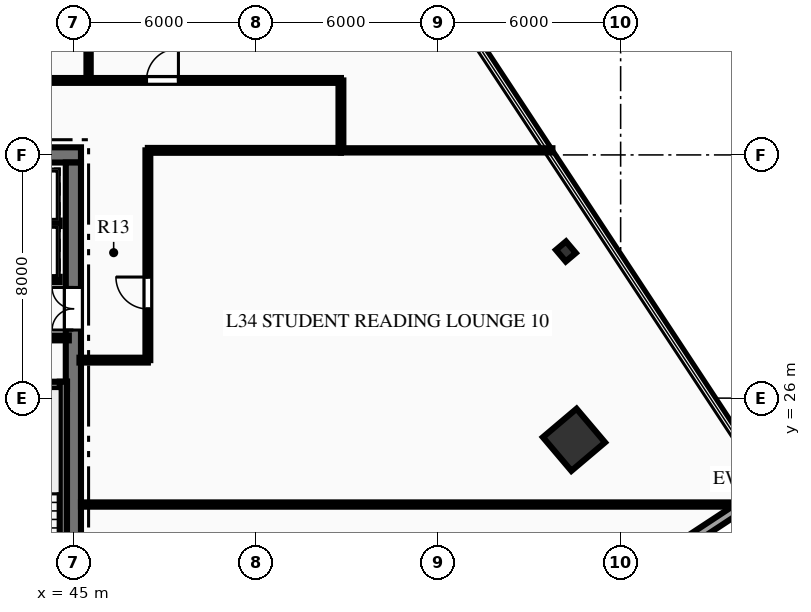
"""IFC4 building model, lengths in metres.
Left out: names, types, materials, properties, quantities, classifications, styles, units other than length and angle.
Written with IfcOpenShell. Run it as: python <this file> out.ifc"""

import sys

from ifc_helpers import new_model, si_unit, direction, frame, frame_2d, origin, origin_2d, place, context, subcontext, project, spatial, rectangle, hollow_rectangle, i_section, extrude, element, fill, save


model = new_model("IFC4")
c1 = context("Model", 3, precision=1e-05, world=origin(), true_north=direction((0.0, 1.0)))
c2 = subcontext(c1, "Body", "Model", "MODEL_VIEW")
j1 = project(units=[si_unit("LENGTHUNIT", "METRE"), si_unit("PLANEANGLEUNIT", "RADIAN")], contexts=[c1])
p1 = place(None, origin())
s1 = spatial("IfcSite", under=j1, at=p1, CompositionType="ELEMENT")
p2 = place(p1, origin())
s2 = spatial("IfcBuilding", under=s1, at=p2, CompositionType="ELEMENT")
p3 = place(p2, frame((0.0, 0.0, 140.7)))
s3 = spatial("IfcBuildingStorey", under=s2, at=p3, CompositionType="ELEMENT", Elevation=140.7)
p4 = place(p3, frame((26.75, 34.0, 0.0), z_axis=(0.0, 0.0, 1.0), x_axis=(1.0, 0.0, 0.0)))
e1 = element("IfcWall", 1, at=p4, inside=s3, PredefinedType="SHEAR", context=c2, shape_type="SweptSolid", body=[
    extrude(rectangle(XDim=18.5, YDim=0.5, at=frame_2d((9.25, 0.0))), origin(), (0.0, 0.0, 1.0), 3.75),
])
p5 = place(p4, frame((13.935, 0.0, 0.0)))
e2 = element("IfcOpeningElement", 2, at=p5, cuts=e1, PredefinedType="OPENING", context=c2, shape_type="SweptSolid", body=[
    extrude(rectangle(XDim=1.1, YDim=2.15, at=frame_2d((0.55, 1.075))), frame((0.0, 0.26, 0.0), z_axis=(0.0, -1.0, 0.0), x_axis=(1.0, 0.0, 0.0)), (0.0, 0.0, 1.0), 0.52),
])
p6 = place(p4, frame((16.185, 0.0, 0.0)))
e3 = element("IfcOpeningElement", 3, at=p6, cuts=e1, PredefinedType="OPENING", context=c2, shape_type="SweptSolid", body=[
    extrude(rectangle(XDim=1.1, YDim=2.15, at=frame_2d((0.55, 1.075))), frame((0.0, 0.26, 0.0), z_axis=(0.0, -1.0, 0.0), x_axis=(1.0, 0.0, 0.0)), (0.0, 0.0, 1.0), 0.52),
])
p7 = place(p3, frame((45.0, 18.25, 0.0), z_axis=(0.0, 0.0, 1.0), x_axis=(0.0, 1.0, 0.0)))
e4 = element("IfcWall", 4, at=p7, inside=s3, PredefinedType="SHEAR", context=c2, shape_type="SweptSolid", body=[
    extrude(rectangle(XDim=15.5, YDim=0.5, at=frame_2d((7.75, 0.0))), origin(), (0.0, 0.0, 1.0), 3.75),
])
p8 = place(p7, frame((9.99, 0.0, 0.0)))
e5 = element("IfcOpeningElement", 5, at=p8, cuts=e4, PredefinedType="OPENING", context=c2, shape_type="SweptSolid", body=[
    extrude(rectangle(XDim=1.4, YDim=2.2, at=frame_2d((0.7, 1.1))), frame((0.0, 0.26, 0.0), z_axis=(0.0, -1.0, 0.0), x_axis=(1.0, 0.0, 0.0)), (0.0, 0.0, 1.0), 0.52),
])
p9 = place(p3, frame((40.81, 26.42, 0.0), z_axis=(0.0, 0.0, 1.0), x_axis=(1.0, 0.0, 0.0)))
e6 = element("IfcWall", 6, at=p9, inside=s3, PredefinedType="SHEAR", context=c2, shape_type="SweptSolid", body=[
    extrude(rectangle(XDim=3.98, YDim=0.24, at=frame_2d((1.99, 0.0))), origin(), (0.0, 0.0, 1.0), 3.75),
])
p10 = place(p3, frame((44.67, 18.28, 0.0), z_axis=(0.0, 0.0, 1.0), x_axis=(0.0, 1.0, 0.0)))
e7 = element("IfcWall", 7, at=p10, inside=s3, PredefinedType="SHEAR", context=c2, shape_type="SweptSolid", body=[
    extrude(rectangle(XDim=8.26, YDim=0.24, at=frame_2d((4.13, 0.0))), origin(), (0.0, 0.0, 1.0), 3.75),
])
p11 = place(p3, frame((61.465, 24.629, 0.0), z_axis=(0.0, 0.0, 1.0), x_axis=(0.763232469783, 0.646123979643, 0.0)))
e8 = element("IfcColumn", 8, at=p11, inside=s3, PredefinedType="COLUMN", context=c2, shape_type="SweptSolid", body=[
    extrude(hollow_rectangle(XDim=1.45, YDim=1.45, WallThickness=0.07, at=origin_2d()), origin(), (0.0, 0.0, 1.0), 3.75),
])
p12 = place(p3, frame((61.199, 30.824, 0.0), z_axis=(0.0, 0.0, 1.0), x_axis=(0.763232469783, 0.646123979643, 0.0)))
e9 = element("IfcColumn", 9, at=p12, inside=s3, PredefinedType="COLUMN", context=c2, shape_type="SweptSolid", body=[
    extrude(i_section(OverallWidth=0.432, OverallDepth=0.498, WebThickness=0.056, FlangeThickness=0.089, at=origin_2d()), origin(), (0.0, 0.0, 1.0), 3.75),
])
p13 = place(p3, frame((68.045, 23.147, 0.0), z_axis=(0.0, 0.0, 1.0), x_axis=(-0.835331522158, -0.549746530767, 0.0)))
e10 = element("IfcWall", 10, at=p13, inside=s3, PredefinedType="STANDARD", context=c2, shape_type="SweptSolid", body=[
    extrude(rectangle(XDim=4.0, YDim=0.32, at=frame_2d((2.0, 0.0))), origin(), (0.0, 0.0, 1.0), 3.46),
])
p14 = place(p3, frame((40.8, 27.98, 0.0), z_axis=(0.0, 0.0, 1.0), x_axis=(1.0, 0.0, 0.0)))
e11 = element("IfcWall", 11, at=p14, inside=s3, PredefinedType="PARTITIONING", context=c2, shape_type="SweptSolid", body=[
    extrude(rectangle(XDim=4.05, YDim=0.16, at=frame_2d((2.025, 0.0))), origin(), (0.0, 0.0, 1.0), 3.46),
])
p15 = place(p14, frame((1.475, 0.0, 0.0)))
e12 = element("IfcOpeningElement", 12, at=p15, cuts=e11, PredefinedType="OPENING", context=c2, shape_type="SweptSolid", body=[
    extrude(rectangle(XDim=0.95, YDim=2.15, at=frame_2d((0.475, 1.075))), frame((0.0, 0.09, 0.0), z_axis=(0.0, -1.0, 0.0), x_axis=(1.0, 0.0, 0.0)), (0.0, 0.0, 1.0), 0.18),
])
p16 = place(p3, frame((40.12, 29.9, 0.0), z_axis=(0.0, 0.0, 1.0), x_axis=(1.0, 0.0, 0.0)))
e13 = element("IfcWall", 13, at=p16, inside=s3, PredefinedType="PARTITIONING", context=c2, shape_type="SweptSolid", body=[
    extrude(rectangle(XDim=4.43, YDim=0.18, at=frame_2d((2.215, 0.0))), origin(), (0.0, 0.0, 1.0), 3.46),
])
p17 = place(p16, frame((0.565, 0.0, 0.0)))
e14 = element("IfcOpeningElement", 14, at=p17, cuts=e13, PredefinedType="OPENING", context=c2, shape_type="SweptSolid", body=[
    extrude(rectangle(XDim=1.1, YDim=2.15, at=frame_2d((0.55, 1.075))), frame((0.0, 0.1, 0.0), z_axis=(0.0, -1.0, 0.0), x_axis=(1.0, 0.0, 0.0)), (0.0, 0.0, 1.0), 0.2),
])
p18 = place(p16, frame((2.815, 0.0, 0.0)))
e15 = element("IfcOpeningElement", 15, at=p18, cuts=e13, PredefinedType="OPENING", context=c2, shape_type="SweptSolid", body=[
    extrude(rectangle(XDim=1.1, YDim=2.15, at=frame_2d((0.55, 1.075))), frame((0.0, 0.1, 0.0), z_axis=(0.0, -1.0, 0.0), x_axis=(1.0, 0.0, 0.0)), (0.0, 0.0, 1.0), 0.2),
])
p19 = place(p3, frame((40.12, 31.75, 0.0), z_axis=(0.0, 0.0, 1.0), x_axis=(1.0, 0.0, 0.0)))
e16 = element("IfcWall", 16, at=p19, inside=s3, PredefinedType="PARTITIONING", context=c2, shape_type="SweptSolid", body=[
    extrude(rectangle(XDim=4.43, YDim=0.18, at=frame_2d((2.215, 0.0))), origin(), (0.0, 0.0, 1.0), 3.46),
])
p20 = place(p3, frame((18.2, 36.45, 0.0), z_axis=(0.0, 0.0, 1.0), x_axis=(1.0, 0.0, 0.0)))
e17 = element("IfcWall", 17, at=p20, inside=s3, PredefinedType="PARTITIONING", context=c2, shape_type="SweptSolid", body=[
    extrude(rectangle(XDim=35.6, YDim=0.16, at=frame_2d((17.8, 0.0))), origin(), (0.0, 0.0, 1.0), 3.46),
])
p21 = place(p20, frame((1.437, 0.0, 0.0)))
e18 = element("IfcOpeningElement", 18, at=p21, cuts=e17, PredefinedType="OPENING", context=c2, shape_type="SweptSolid", body=[
    extrude(rectangle(XDim=1.05, YDim=2.15, at=frame_2d((0.525, 1.075))), frame((0.0, 0.09, 0.0), z_axis=(0.0, -1.0, 0.0), x_axis=(1.0, 0.0, 0.0)), (0.0, 0.0, 1.0), 0.18),
])
p22 = place(p20, frame((12.535, 0.0, 0.0)))
e19 = element("IfcOpeningElement", 19, at=p22, cuts=e17, PredefinedType="OPENING", context=c2, shape_type="SweptSolid", body=[
    extrude(rectangle(XDim=1.05, YDim=2.15, at=frame_2d((0.525, 1.075))), frame((0.0, 0.09, 0.0), z_axis=(0.0, -1.0, 0.0), x_axis=(1.0, 0.0, 0.0)), (0.0, 0.0, 1.0), 0.18),
])
p23 = place(p20, frame((19.175, 0.0, 0.0)))
e20 = element("IfcOpeningElement", 20, at=p23, cuts=e17, PredefinedType="OPENING", context=c2, shape_type="SweptSolid", body=[
    extrude(rectangle(XDim=1.05, YDim=2.15, at=frame_2d((0.525, 1.075))), frame((0.0, 0.09, 0.0), z_axis=(0.0, -1.0, 0.0), x_axis=(1.0, 0.0, 0.0)), (0.0, 0.0, 1.0), 0.18),
])
p24 = place(p20, frame((29.205, 0.0, 0.0)))
e21 = element("IfcOpeningElement", 21, at=p24, cuts=e17, PredefinedType="OPENING", context=c2, shape_type="SweptSolid", body=[
    extrude(rectangle(XDim=1.05, YDim=2.15, at=frame_2d((0.525, 1.075))), frame((0.0, 0.09, 0.0), z_axis=(0.0, -1.0, 0.0), x_axis=(1.0, 0.0, 0.0)), (0.0, 0.0, 1.0), 0.18),
])
p25 = place(p3, frame((47.45, 34.15, 0.0), z_axis=(0.0, 0.0, 1.0), x_axis=(1.0, 0.0, 0.0)))
e22 = element("IfcWall", 22, at=p25, inside=s3, PredefinedType="PARTITIONING", context=c2, shape_type="SweptSolid", body=[
    extrude(rectangle(XDim=6.35, YDim=0.16, at=frame_2d((3.175, 0.0))), origin(), (0.0, 0.0, 1.0), 3.46),
])
p26 = place(p3, frame((47.45, 27.25, 0.0), z_axis=(0.0, 0.0, 1.0), x_axis=(0.0, 1.0, 0.0)))
e23 = element("IfcWall", 23, at=p26, inside=s3, PredefinedType="PARTITIONING", context=c2, shape_type="SweptSolid", body=[
    extrude(rectangle(XDim=6.9, YDim=0.16, at=frame_2d((3.45, 0.0))), origin(), (0.0, 0.0, 1.0), 3.46),
])
p27 = place(p26, frame((1.683, 0.0, 0.0)))
e24 = element("IfcOpeningElement", 24, at=p27, cuts=e23, PredefinedType="OPENING", context=c2, shape_type="SweptSolid", body=[
    extrude(rectangle(XDim=1.05, YDim=2.15, at=frame_2d((0.525, 1.075))), frame((0.0, 0.09, 0.0), z_axis=(0.0, -1.0, 0.0), x_axis=(1.0, 0.0, 0.0)), (0.0, 0.0, 1.0), 0.18),
])
p28 = place(p3, frame((45.2, 27.25, 0.0), z_axis=(0.0, 0.0, 1.0), x_axis=(1.0, 0.0, 0.0)))
e25 = element("IfcWall", 25, at=p28, inside=s3, PredefinedType="PARTITIONING", context=c2, shape_type="SweptSolid", body=[
    extrude(rectangle(XDim=2.25, YDim=0.16, at=frame_2d((1.125, 0.0))), origin(), (0.0, 0.0, 1.0), 3.46),
])
p29 = place(p3, frame((53.8, 34.15, 0.0), z_axis=(0.0, 0.0, 1.0), x_axis=(0.0, 1.0, 0.0)))
e26 = element("IfcWall", 26, at=p29, inside=s3, PredefinedType="PARTITIONING", context=c2, shape_type="SweptSolid", body=[
    extrude(rectangle(XDim=2.3, YDim=0.16, at=frame_2d((1.15, 0.0))), origin(), (0.0, 0.0, 1.0), 3.46),
])
p30 = place(p3, frame((53.8, 34.15, 0.0), z_axis=(0.0, 0.0, 1.0), x_axis=(1.0, 0.0, 0.0)))
e27 = element("IfcWall", 27, at=p30, inside=s3, PredefinedType="PARTITIONING", context=c2, shape_type="SweptSolid", body=[
    extrude(rectangle(XDim=6.956, YDim=0.14, at=frame_2d((3.478, 0.0))), origin(), (0.0, 0.0, 1.0), 3.46),
])
p31 = place(p3, frame((45.5, 36.45, 0.0), z_axis=(0.0, 0.0, 1.0), x_axis=(0.0, 1.0, 0.0)))
e28 = element("IfcWall", 28, at=p31, inside=s3, PredefinedType="PARTITIONING", context=c2, shape_type="SweptSolid", body=[
    extrude(rectangle(XDim=19.458, YDim=0.14, at=frame_2d((9.729, 0.0))), origin(), (0.0, 0.0, 1.0), 3.46),
])
p32 = place(p3, frame((45.25, 22.5, 0.0), z_axis=(0.0, 0.0, 1.0), x_axis=(1.0, 0.0, 0.0)))
e29 = element("IfcWall", 29, at=p32, inside=s3, PredefinedType="PARTITIONING", context=c2, shape_type="SweptSolid", body=[
    extrude(rectangle(XDim=21.739, YDim=0.14, at=frame_2d((10.87, 0.0))), origin(), (0.0, 0.0, 1.0), 3.46),
])
p33 = place(p8, origin())
e30 = element("IfcDoor", 30, at=p33, inside=s3, OperationType="DOUBLE_DOOR_SINGLE_SWING", PredefinedType="DOOR", context=c2, shape_type="SweptSolid", body=[
    extrude(rectangle(XDim=1.4, YDim=2.2, at=frame_2d((0.7, 1.1))), frame((0.0, 0.025, 0.0), z_axis=(0.0, -1.0, 0.0), x_axis=(1.0, 0.0, 0.0)), (0.0, 0.0, 1.0), 0.05),
])
fill(e5, e30)
p34 = place(p24, origin())
e31 = element("IfcDoor", 31, at=p34, inside=s3, OperationType="SINGLE_SWING_RIGHT", PredefinedType="DOOR", context=c2, shape_type="SweptSolid", body=[
    extrude(rectangle(XDim=1.05, YDim=2.15, at=frame_2d((0.525, 1.075))), frame((0.0, 0.025, 0.0), z_axis=(0.0, -1.0, 0.0), x_axis=(1.0, 0.0, 0.0)), (0.0, 0.0, 1.0), 0.05),
])
fill(e21, e31)
p35 = place(p27, origin())
e32 = element("IfcDoor", 32, at=p35, inside=s3, OperationType="SINGLE_SWING_RIGHT", PredefinedType="DOOR", context=c2, shape_type="SweptSolid", body=[
    extrude(rectangle(XDim=1.05, YDim=2.15, at=frame_2d((0.525, 1.075))), frame((0.0, 0.025, 0.0), z_axis=(0.0, -1.0, 0.0), x_axis=(1.0, 0.0, 0.0)), (0.0, 0.0, 1.0), 0.05),
])
fill(e24, e32)
save(model, sys.argv[1])
